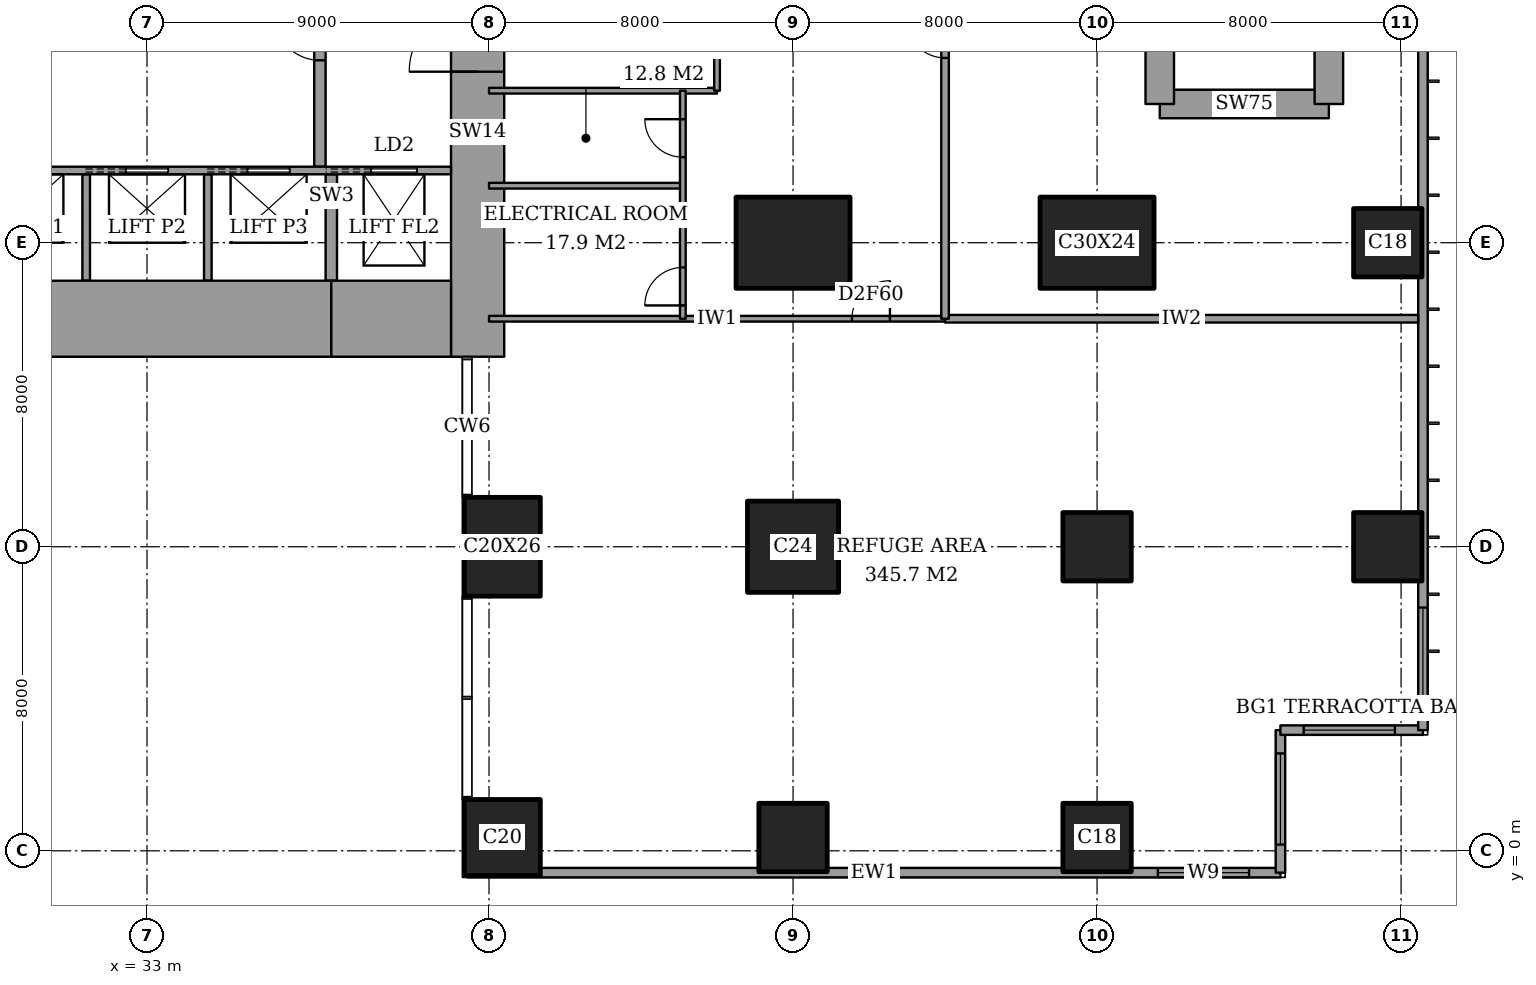
"""IFC4 building model, lengths in metres.
Left out: names, types, materials, properties, quantities, classifications, styles, units other than length and angle.
Written with IfcOpenShell. Run it as: python <this file> out.ifc"""

import sys

from ifc_helpers import new_model, si_unit, direction, frame, frame_2d, origin, origin_2d, place, context, subcontext, project, spatial, rectangle, extrude, element, fill, save


model = new_model("IFC4")
c1 = context("Model", 3, precision=1e-05, world=origin(), true_north=direction((0.0, 1.0)))
c2 = subcontext(c1, "Body", "Model", "MODEL_VIEW")
j1 = project(units=[si_unit("LENGTHUNIT", "METRE"), si_unit("PLANEANGLEUNIT", "RADIAN")], contexts=[c1])
p1 = place(None, origin())
s1 = spatial("IfcSite", under=j1, at=p1, CompositionType="ELEMENT")
p2 = place(p1, origin())
s2 = spatial("IfcBuilding", under=s1, at=p2, CompositionType="ELEMENT")
p3 = place(p2, frame((0.0, 0.0, 171.8)))
s3 = spatial("IfcBuildingStorey", under=s2, at=p3, CompositionType="ELEMENT", Elevation=171.8)
p4 = place(p3, frame((42.35, 0.35, 0.0), z_axis=(0.0, 0.0, 1.0), x_axis=(1.0, 0.0, 0.0)))
e1 = element("IfcColumn", 1, at=p4, inside=s3, PredefinedType="COLUMN", context=c2, shape_type="SweptSolid", body=[
    extrude(rectangle(XDim=2.0, YDim=2.0, at=origin_2d()), origin(), (0.0, 0.0, 1.0), 5.4),
])
p5 = place(p3, frame((42.35, 8.0, 0.0), z_axis=(0.0, 0.0, 1.0), x_axis=(1.0, 0.0, 0.0)))
e2 = element("IfcColumn", 2, at=p5, inside=s3, PredefinedType="COLUMN", context=c2, shape_type="SweptSolid", body=[
    extrude(rectangle(XDim=2.0, YDim=2.6, at=origin_2d()), origin(), (0.0, 0.0, 1.0), 5.4),
])
p6 = place(p3, frame((50.0, 0.35, 0.0), z_axis=(0.0, 0.0, 1.0), x_axis=(1.0, 0.0, 0.0)))
e3 = element("IfcColumn", 3, at=p6, inside=s3, PredefinedType="COLUMN", context=c2, shape_type="SweptSolid", body=[
    extrude(rectangle(XDim=1.8, YDim=1.8, at=origin_2d()), origin(), (0.0, 0.0, 1.0), 5.4),
])
p7 = place(p3, frame((50.0, 8.0, 0.0), z_axis=(0.0, 0.0, 1.0), x_axis=(1.0, 0.0, 0.0)))
e4 = element("IfcColumn", 4, at=p7, inside=s3, PredefinedType="COLUMN", context=c2, shape_type="SweptSolid", body=[
    extrude(rectangle(XDim=2.4, YDim=2.4, at=origin_2d()), origin(), (0.0, 0.0, 1.0), 5.4),
])
p8 = place(p3, frame((50.0, 16.0, 0.0), z_axis=(0.0, 0.0, 1.0), x_axis=(1.0, 0.0, 0.0)))
e5 = element("IfcColumn", 5, at=p8, inside=s3, PredefinedType="COLUMN", context=c2, shape_type="SweptSolid", body=[
    extrude(rectangle(XDim=3.0, YDim=2.4, at=origin_2d()), origin(), (0.0, 0.0, 1.0), 5.4),
])
for number, where, z_axis, x_axis in (
    (6, (58.0, 0.35, 0.0), (0.0, 0.0, 1.0), (1.0, 0.0, 0.0)),
    (7, (58.0, 8.0, 0.0), (0.0, 0.0, 1.0), (1.0, 0.0, 0.0)),
):
    element("IfcColumn", number, at=place(p3, frame(where, z_axis=z_axis, x_axis=x_axis)), inside=s3, PredefinedType="COLUMN", context=c2, shape_type="SweptSolid", body=[
        extrude(rectangle(XDim=1.8, YDim=1.8, at=origin_2d()), origin(), (0.0, 0.0, 1.0), 5.4),
    ])
p9 = place(p3, frame((58.0, 16.0, 0.0), z_axis=(0.0, 0.0, 1.0), x_axis=(1.0, 0.0, 0.0)))
e8 = element("IfcColumn", 8, at=p9, inside=s3, PredefinedType="COLUMN", context=c2, shape_type="SweptSolid", body=[
    extrude(rectangle(XDim=3.0, YDim=2.4, at=origin_2d()), origin(), (0.0, 0.0, 1.0), 5.4),
])
for number, where, z_axis, x_axis in (
    (9, (65.65, 8.0, 0.0), (0.0, 0.0, 1.0), (1.0, 0.0, 0.0)),
    (10, (65.65, 16.0, 0.0), (0.0, 0.0, 1.0), (1.0, 0.0, 0.0)),
):
    element("IfcColumn", number, at=place(p3, frame(where, z_axis=z_axis, x_axis=x_axis)), inside=s3, PredefinedType="COLUMN", context=c2, shape_type="SweptSolid", body=[
        extrude(rectangle(XDim=1.8, YDim=1.8, at=origin_2d()), origin(), (0.0, 0.0, 1.0), 5.4),
    ])
p10 = place(p3, frame((28.15, 14.0, 0.0), z_axis=(0.0, 0.0, 1.0), x_axis=(1.0, 0.0, 0.0)))
e11 = element("IfcWall", 11, at=p10, inside=s3, PredefinedType="SHEAR", context=c2, shape_type="SweptSolid", body=[
    extrude(rectangle(XDim=9.7, YDim=2.0, at=frame_2d((4.85, 0.0))), origin(), (0.0, 0.0, 1.0), 5.4),
])
p11 = place(p3, frame((37.85, 14.0, 0.0), z_axis=(0.0, 0.0, 1.0), x_axis=(1.0, 0.0, 0.0)))
e12 = element("IfcWall", 12, at=p11, inside=s3, PredefinedType="SHEAR", context=c2, shape_type="SweptSolid", body=[
    extrude(rectangle(XDim=3.15, YDim=2.0, at=frame_2d((1.575, 0.0))), origin(), (0.0, 0.0, 1.0), 5.4),
])
p12 = place(p3, frame((41.7, 13.0, 0.0), z_axis=(0.0, 0.0, 1.0), x_axis=(0.0, 1.0, 0.0)))
e13 = element("IfcWall", 13, at=p12, inside=s3, PredefinedType="SHEAR", context=c2, shape_type="SweptSolid", body=[
    extrude(rectangle(XDim=11.85, YDim=1.4, at=frame_2d((5.925, 0.0))), origin(), (0.0, 0.0, 1.0), 5.4),
])
p13 = place(p12, frame((7.5, 0.0, 0.0)))
e14 = element("IfcOpeningElement", 14, at=p13, cuts=e13, PredefinedType="OPENING", context=c2, shape_type="SweptSolid", body=[
    extrude(rectangle(XDim=1.8, YDim=2.4, at=frame_2d((0.9, 1.2))), frame((0.0, 0.71, 0.0), z_axis=(0.0, -1.0, 0.0), x_axis=(1.0, 0.0, 0.0)), (0.0, 0.0, 1.0), 1.42),
])
p14 = place(p3, frame((37.55, 18.0, 0.0), z_axis=(0.0, 0.0, 1.0), x_axis=(0.0, 1.0, 0.0)))
e15 = element("IfcWall", 15, at=p14, inside=s3, PredefinedType="PARTITIONING", context=c2, shape_type="SweptSolid", body=[
    extrude(rectangle(XDim=6.7, YDim=0.3, at=frame_2d((3.35, 0.0))), origin(), (0.0, 0.0, 1.0), 5.4),
])
p15 = place(p14, frame((2.8, 0.0, 0.0)))
e16 = element("IfcOpeningElement", 16, at=p15, cuts=e15, PredefinedType="OPENING", context=c2, shape_type="SweptSolid", body=[
    extrude(rectangle(XDim=1.2, YDim=2.1, at=frame_2d((0.6, 1.05))), frame((0.0, 0.16, 0.0), z_axis=(0.0, -1.0, 0.0), x_axis=(1.0, 0.0, 0.0)), (0.0, 0.0, 1.0), 0.32),
])
p16 = place(p3, frame((59.65, 19.65, 0.0), z_axis=(0.0, 0.0, 1.0), x_axis=(1.0, 0.0, 0.0)))
e17 = element("IfcWall", 17, at=p16, inside=s3, PredefinedType="SHEAR", context=c2, shape_type="SweptSolid", body=[
    extrude(rectangle(XDim=4.45, YDim=0.75, at=frame_2d((2.225, 0.0))), origin(), (0.0, 0.0, 1.0), 5.4),
])
for number, where, z_axis, x_axis in (
    (18, (64.1, 19.65, 0.0), (0.0, 0.0, 1.0), (0.0, 1.0, 0.0)),
    (19, (59.65, 28.35, 0.0), (0.0, 0.0, 1.0), (0.0, -1.0, 0.0)),
):
    element("IfcWall", number, at=place(p3, frame(where, z_axis=z_axis, x_axis=x_axis)), inside=s3, PredefinedType="SHEAR", context=c2, shape_type="SweptSolid", body=[
        extrude(rectangle(XDim=8.7, YDim=0.75, at=frame_2d((4.35, 0.0))), origin(), (0.0, 0.0, 1.0), 5.4),
    ])
p17 = place(p3, frame((41.425, -0.575, 0.0), z_axis=(0.0, 0.0, 1.0), x_axis=(1.0, 0.0, 0.0)))
e20 = element("IfcWall", 20, at=p17, inside=s3, PredefinedType="SOLIDWALL", context=c2, shape_type="SweptSolid", body=[
    extrude(rectangle(XDim=21.4, YDim=0.25, at=frame_2d((10.7, 0.0))), origin(), (0.0, 0.0, 1.0), 5.4),
])
p18 = place(p17, frame((18.175, 0.0, 0.9)))
e21 = element("IfcOpeningElement", 21, at=p18, cuts=e20, PredefinedType="OPENING", context=c2, shape_type="SweptSolid", body=[
    extrude(rectangle(XDim=2.4, YDim=2.4, at=frame_2d((1.2, 1.2))), frame((0.0, 0.135, 0.0), z_axis=(0.0, -1.0, 0.0), x_axis=(1.0, 0.0, 0.0)), (0.0, 0.0, 1.0), 0.27),
])
p19 = place(p3, frame((62.825, -0.575, 0.0), z_axis=(0.0, 0.0, 1.0), x_axis=(0.0, 1.0, 0.0)))
e22 = element("IfcWall", 22, at=p19, inside=s3, PredefinedType="SOLIDWALL", context=c2, shape_type="SweptSolid", body=[
    extrude(rectangle(XDim=3.75, YDim=0.25, at=frame_2d((1.875, 0.0))), origin(), (0.0, 0.0, 1.0), 5.4),
])
p20 = place(p19, frame((0.738, 0.0, 0.9)))
e23 = element("IfcOpeningElement", 23, at=p20, cuts=e22, PredefinedType="OPENING", context=c2, shape_type="SweptSolid", body=[
    extrude(rectangle(XDim=2.4, YDim=2.4, at=frame_2d((1.2, 1.2))), frame((0.0, 0.135, 0.0), z_axis=(0.0, -1.0, 0.0), x_axis=(1.0, 0.0, 0.0)), (0.0, 0.0, 1.0), 0.27),
])
p21 = place(p3, frame((62.825, 3.175, 0.0), z_axis=(0.0, 0.0, 1.0), x_axis=(1.0, 0.0, 0.0)))
e24 = element("IfcWall", 24, at=p21, inside=s3, PredefinedType="SOLIDWALL", context=c2, shape_type="SweptSolid", body=[
    extrude(rectangle(XDim=3.75, YDim=0.25, at=frame_2d((1.875, 0.0))), origin(), (0.0, 0.0, 1.0), 5.4),
])
p22 = place(p21, frame((0.613, 0.0, 0.9)))
e25 = element("IfcOpeningElement", 25, at=p22, cuts=e24, PredefinedType="OPENING", context=c2, shape_type="SweptSolid", body=[
    extrude(rectangle(XDim=2.4, YDim=2.4, at=frame_2d((1.2, 1.2))), frame((0.0, 0.135, 0.0), z_axis=(0.0, -1.0, 0.0), x_axis=(1.0, 0.0, 0.0)), (0.0, 0.0, 1.0), 0.27),
])
p23 = place(p3, frame((66.575, 3.175, 0.0), z_axis=(0.0, 0.0, 1.0), x_axis=(0.0, 1.0, 0.0)))
e26 = element("IfcWall", 26, at=p23, inside=s3, PredefinedType="SOLIDWALL", context=c2, shape_type="SweptSolid", body=[
    extrude(rectangle(XDim=41.65, YDim=0.25, at=frame_2d((20.825, 0.0))), origin(), (0.0, 0.0, 1.0), 5.4),
])
p24 = place(p23, frame((0.825, 0.0, 0.9)))
e27 = element("IfcOpeningElement", 27, at=p24, cuts=e26, PredefinedType="OPENING", context=c2, shape_type="SweptSolid", body=[
    extrude(rectangle(XDim=2.4, YDim=2.4, at=frame_2d((1.2, 1.2))), frame((0.0, 0.135, 0.0), z_axis=(0.0, -1.0, 0.0), x_axis=(1.0, 0.0, 0.0)), (0.0, 0.0, 1.0), 0.27),
])
p25 = place(p23, frame((38.425, 0.0, 0.9)))
e28 = element("IfcOpeningElement", 28, at=p25, cuts=e26, PredefinedType="OPENING", context=c2, shape_type="SweptSolid", body=[
    extrude(rectangle(XDim=2.4, YDim=2.4, at=frame_2d((1.2, 1.2))), frame((0.0, 0.135, 0.0), z_axis=(0.0, -1.0, 0.0), x_axis=(1.0, 0.0, 0.0)), (0.0, 0.0, 1.0), 0.27),
])
p26 = place(p3, frame((54.0, 14.0, 0.0), z_axis=(0.0, 0.0, 1.0), x_axis=(1.0, 0.0, 0.0)))
e29 = element("IfcWall", 29, at=p26, inside=s3, PredefinedType="PARTITIONING", context=c2, shape_type="SweptSolid", body=[
    extrude(rectangle(XDim=12.45, YDim=0.2, at=frame_2d((6.225, 0.0))), origin(), (0.0, 0.0, 1.0), 5.15),
])
p27 = place(p3, frame((42.0, 14.0, 0.0), z_axis=(0.0, 0.0, 1.0), x_axis=(1.0, 0.0, 0.0)))
e30 = element("IfcWall", 30, at=p27, inside=s3, PredefinedType="PARTITIONING", context=c2, shape_type="SweptSolid", body=[
    extrude(rectangle(XDim=12.0, YDim=0.15, at=frame_2d((6.0, 0.0))), origin(), (0.0, 0.0, 1.0), 5.15),
])
p28 = place(p27, frame((9.55, 0.0, 0.0)))
e31 = element("IfcOpeningElement", 31, at=p28, cuts=e30, PredefinedType="OPENING", context=c2, shape_type="SweptSolid", body=[
    extrude(rectangle(XDim=1.0, YDim=2.1, at=frame_2d((0.5, 1.05))), frame((0.0, 0.085, 0.0), z_axis=(0.0, -1.0, 0.0), x_axis=(1.0, 0.0, 0.0)), (0.0, 0.0, 1.0), 0.17),
])
p29 = place(p3, frame((42.0, 17.5, 0.0), z_axis=(0.0, 0.0, 1.0), x_axis=(1.0, 0.0, 0.0)))
e32 = element("IfcWall", 32, at=p29, inside=s3, PredefinedType="PARTITIONING", context=c2, shape_type="SweptSolid", body=[
    extrude(rectangle(XDim=5.1, YDim=0.15, at=frame_2d((2.55, 0.0))), origin(), (0.0, 0.0, 1.0), 5.15),
])
p30 = place(p3, frame((42.0, 20.0, 0.0), z_axis=(0.0, 0.0, 1.0), x_axis=(1.0, 0.0, 0.0)))
e33 = element("IfcWall", 33, at=p30, inside=s3, PredefinedType="PARTITIONING", context=c2, shape_type="SweptSolid", body=[
    extrude(rectangle(XDim=6.0, YDim=0.15, at=frame_2d((3.0, 0.0))), origin(), (0.0, 0.0, 1.0), 5.15),
])
p31 = place(p3, frame((47.1, 14.0, 0.0), z_axis=(0.0, 0.0, 1.0), x_axis=(0.0, 1.0, 0.0)))
e34 = element("IfcWall", 34, at=p31, inside=s3, PredefinedType="PARTITIONING", context=c2, shape_type="SweptSolid", body=[
    extrude(rectangle(XDim=6.0, YDim=0.15, at=frame_2d((3.0, 0.0))), origin(), (0.0, 0.0, 1.0), 5.15),
])
p32 = place(p31, frame((0.35, 0.0, 0.0)))
e35 = element("IfcOpeningElement", 35, at=p32, cuts=e34, PredefinedType="OPENING", context=c2, shape_type="SweptSolid", body=[
    extrude(rectangle(XDim=1.0, YDim=2.1, at=frame_2d((0.5, 1.05))), frame((0.0, 0.085, 0.0), z_axis=(0.0, -1.0, 0.0), x_axis=(1.0, 0.0, 0.0)), (0.0, 0.0, 1.0), 0.17),
])
p33 = place(p31, frame((4.25, 0.0, 0.0)))
e36 = element("IfcOpeningElement", 36, at=p33, cuts=e34, PredefinedType="OPENING", context=c2, shape_type="SweptSolid", body=[
    extrude(rectangle(XDim=1.0, YDim=2.1, at=frame_2d((0.5, 1.05))), frame((0.0, 0.085, 0.0), z_axis=(0.0, -1.0, 0.0), x_axis=(1.0, 0.0, 0.0)), (0.0, 0.0, 1.0), 0.17),
])
p34 = place(p3, frame((48.0, 20.0, 0.0), z_axis=(0.0, 0.0, 1.0), x_axis=(0.0, 1.0, 0.0)))
e37 = element("IfcWall", 37, at=p34, inside=s3, PredefinedType="PARTITIONING", context=c2, shape_type="SweptSolid", body=[
    extrude(rectangle(XDim=8.0, YDim=0.15, at=frame_2d((4.0, 0.0))), origin(), (0.0, 0.0, 1.0), 5.15),
])
p35 = place(p34, frame((4.7, 0.0, 0.0)))
e38 = element("IfcOpeningElement", 38, at=p35, cuts=e37, PredefinedType="OPENING", context=c2, shape_type="SweptSolid", body=[
    extrude(rectangle(XDim=1.0, YDim=2.1, at=frame_2d((0.5, 1.05))), frame((0.0, 0.085, 0.0), z_axis=(0.0, -1.0, 0.0), x_axis=(1.0, 0.0, 0.0)), (0.0, 0.0, 1.0), 0.17),
])
p36 = place(p3, frame((54.0, 14.0, 0.0), z_axis=(0.0, 0.0, 1.0), x_axis=(0.0, 1.0, 0.0)))
e39 = element("IfcWall", 39, at=p36, inside=s3, PredefinedType="PARTITIONING", context=c2, shape_type="SweptSolid", body=[
    extrude(rectangle(XDim=14.725, YDim=0.2, at=frame_2d((7.363, 0.0))), origin(), (0.0, 0.0, 1.0), 5.15),
])
p37 = place(p36, frame((6.863, 0.0, 0.0)))
e40 = element("IfcOpeningElement", 40, at=p37, cuts=e39, PredefinedType="OPENING", context=c2, shape_type="SweptSolid", body=[
    extrude(rectangle(XDim=1.0, YDim=2.1, at=frame_2d((0.5, 1.05))), frame((0.0, 0.11, 0.0), z_axis=(0.0, -1.0, 0.0), x_axis=(1.0, 0.0, 0.0)), (0.0, 0.0, 1.0), 0.22),
])
p38 = place(p3, frame((28.3, 17.9, 0.0), z_axis=(0.0, 0.0, 1.0), x_axis=(1.0, 0.0, 0.0)))
e41 = element("IfcWall", 41, at=p38, inside=s3, PredefinedType="PARTITIONING", context=c2, shape_type="SweptSolid", body=[
    extrude(rectangle(XDim=12.7, YDim=0.2, at=frame_2d((6.35, 0.0))), origin(), (0.0, 0.0, 1.0), 5.4),
])
p39 = place(p38, frame((0.95, 0.0, 0.0)))
e42 = element("IfcOpeningElement", 42, at=p39, cuts=e41, PredefinedType="OPENING", context=c2, shape_type="SweptSolid", body=[
    extrude(rectangle(XDim=1.1, YDim=2.1, at=frame_2d((0.55, 1.05))), frame((0.0, 0.11, 0.0), z_axis=(0.0, -1.0, 0.0), x_axis=(1.0, 0.0, 0.0)), (0.0, 0.0, 1.0), 0.22),
])
p40 = place(p38, frame((4.15, 0.0, 0.0)))
e43 = element("IfcOpeningElement", 43, at=p40, cuts=e41, PredefinedType="OPENING", context=c2, shape_type="SweptSolid", body=[
    extrude(rectangle(XDim=1.1, YDim=2.1, at=frame_2d((0.55, 1.05))), frame((0.0, 0.11, 0.0), z_axis=(0.0, -1.0, 0.0), x_axis=(1.0, 0.0, 0.0)), (0.0, 0.0, 1.0), 0.22),
])
p41 = place(p38, frame((7.35, 0.0, 0.0)))
e44 = element("IfcOpeningElement", 44, at=p41, cuts=e41, PredefinedType="OPENING", context=c2, shape_type="SweptSolid", body=[
    extrude(rectangle(XDim=1.1, YDim=2.1, at=frame_2d((0.55, 1.05))), frame((0.0, 0.11, 0.0), z_axis=(0.0, -1.0, 0.0), x_axis=(1.0, 0.0, 0.0)), (0.0, 0.0, 1.0), 0.22),
])
p42 = place(p38, frame((10.6, 0.0, 0.0)))
e45 = element("IfcOpeningElement", 45, at=p42, cuts=e41, PredefinedType="OPENING", context=c2, shape_type="SweptSolid", body=[
    extrude(rectangle(XDim=1.2, YDim=2.1, at=frame_2d((0.6, 1.05))), frame((0.0, 0.11, 0.0), z_axis=(0.0, -1.0, 0.0), x_axis=(1.0, 0.0, 0.0)), (0.0, 0.0, 1.0), 0.22),
])
for number, where, z_axis, x_axis in (
    (46, (31.4, 15.0, 0.0), (0.0, 0.0, 1.0), (0.0, 1.0, 0.0)),
    (47, (34.6, 15.0, 0.0), (0.0, 0.0, 1.0), (0.0, 1.0, 0.0)),
):
    element("IfcWall", number, at=place(p3, frame(where, z_axis=z_axis, x_axis=x_axis)), inside=s3, PredefinedType="PARTITIONING", context=c2, shape_type="SweptSolid", body=[
        extrude(rectangle(XDim=2.8, YDim=0.2, at=frame_2d((1.4, 0.0))), origin(), (0.0, 0.0, 1.0), 5.4),
    ])
p43 = place(p3, frame((37.85, 15.0, 0.0), z_axis=(0.0, 0.0, 1.0), x_axis=(0.0, 1.0, 0.0)))
e48 = element("IfcWall", 48, at=p43, inside=s3, PredefinedType="SHEAR", context=c2, shape_type="SweptSolid", body=[
    extrude(rectangle(XDim=2.8, YDim=0.3, at=frame_2d((1.4, 0.0))), origin(), (0.0, 0.0, 1.0), 5.4),
])
p44 = place(p18, origin())
e49 = element("IfcWindow", 49, at=p44, inside=s3, PartitioningType="SINGLE_PANEL", PredefinedType="WINDOW", context=c2, shape_type="SweptSolid", body=[
    extrude(rectangle(XDim=2.4, YDim=2.4, at=frame_2d((1.2, 1.2))), frame((0.0, 0.03, 0.0), z_axis=(0.0, -1.0, 0.0), x_axis=(1.0, 0.0, 0.0)), (0.0, 0.0, 1.0), 0.06),
])
fill(e21, e49)
p45 = place(p20, origin())
e50 = element("IfcWindow", 50, at=p45, inside=s3, PartitioningType="SINGLE_PANEL", PredefinedType="WINDOW", context=c2, shape_type="SweptSolid", body=[
    extrude(rectangle(XDim=2.4, YDim=2.4, at=frame_2d((1.2, 1.2))), frame((0.0, 0.03, 0.0), z_axis=(0.0, -1.0, 0.0), x_axis=(1.0, 0.0, 0.0)), (0.0, 0.0, 1.0), 0.06),
])
fill(e23, e50)
p46 = place(p22, origin())
e51 = element("IfcWindow", 51, at=p46, inside=s3, PartitioningType="SINGLE_PANEL", PredefinedType="WINDOW", context=c2, shape_type="SweptSolid", body=[
    extrude(rectangle(XDim=2.4, YDim=2.4, at=frame_2d((1.2, 1.2))), frame((0.0, 0.03, 0.0), z_axis=(0.0, -1.0, 0.0), x_axis=(1.0, 0.0, 0.0)), (0.0, 0.0, 1.0), 0.06),
])
fill(e25, e51)
p47 = place(p24, origin())
e52 = element("IfcWindow", 52, at=p47, inside=s3, PartitioningType="SINGLE_PANEL", PredefinedType="WINDOW", context=c2, shape_type="SweptSolid", body=[
    extrude(rectangle(XDim=2.4, YDim=2.4, at=frame_2d((1.2, 1.2))), frame((0.0, 0.03, 0.0), z_axis=(0.0, -1.0, 0.0), x_axis=(1.0, 0.0, 0.0)), (0.0, 0.0, 1.0), 0.06),
])
fill(e27, e52)
p48 = place(p28, origin())
e53 = element("IfcDoor", 53, at=p48, inside=s3, OperationType="SINGLE_SWING_LEFT", PredefinedType="DOOR", context=c2, shape_type="SweptSolid", body=[
    extrude(rectangle(XDim=1.0, YDim=2.1, at=frame_2d((0.5, 1.05))), frame((0.0, 0.025, 0.0), z_axis=(0.0, -1.0, 0.0), x_axis=(1.0, 0.0, 0.0)), (0.0, 0.0, 1.0), 0.05),
])
fill(e31, e53)
p49 = place(p37, origin())
e54 = element("IfcDoor", 54, at=p49, inside=s3, OperationType="SINGLE_SWING_LEFT", PredefinedType="DOOR", context=c2, shape_type="SweptSolid", body=[
    extrude(rectangle(XDim=1.0, YDim=2.1, at=frame_2d((0.5, 1.05))), frame((0.0, 0.025, 0.0), z_axis=(0.0, -1.0, 0.0), x_axis=(1.0, 0.0, 0.0)), (0.0, 0.0, 1.0), 0.05),
])
fill(e40, e54)
p50 = place(p32, origin())
e55 = element("IfcDoor", 55, at=p50, inside=s3, OperationType="SINGLE_SWING_RIGHT", PredefinedType="DOOR", context=c2, shape_type="SweptSolid", body=[
    extrude(rectangle(XDim=1.0, YDim=2.1, at=frame_2d((0.5, 1.05))), frame((0.0, 0.025, 0.0), z_axis=(0.0, -1.0, 0.0), x_axis=(1.0, 0.0, 0.0)), (0.0, 0.0, 1.0), 0.05),
])
fill(e35, e55)
p51 = place(p33, origin())
e56 = element("IfcDoor", 56, at=p51, inside=s3, OperationType="SINGLE_SWING_LEFT", PredefinedType="DOOR", context=c2, shape_type="SweptSolid", body=[
    extrude(rectangle(XDim=1.0, YDim=2.1, at=frame_2d((0.5, 1.05))), frame((0.0, 0.025, 0.0), z_axis=(0.0, -1.0, 0.0), x_axis=(1.0, 0.0, 0.0)), (0.0, 0.0, 1.0), 0.05),
])
fill(e36, e56)
p52 = place(p15, origin())
e57 = element("IfcDoor", 57, at=p52, inside=s3, OperationType="SINGLE_SWING_LEFT", PredefinedType="DOOR", context=c2, shape_type="SweptSolid", body=[
    extrude(rectangle(XDim=1.2, YDim=2.1, at=frame_2d((0.6, 1.05))), frame((0.0, 0.025, 0.0), z_axis=(0.0, -1.0, 0.0), x_axis=(1.0, 0.0, 0.0)), (0.0, 0.0, 1.0), 0.05),
])
fill(e16, e57)
p53 = place(p13, origin())
e58 = element("IfcDoor", 58, at=p53, inside=s3, OperationType="DOUBLE_DOOR_DOUBLE_SWING", PredefinedType="DOOR", context=c2, shape_type="SweptSolid", body=[
    extrude(rectangle(XDim=1.8, YDim=2.4, at=frame_2d((0.9, 1.2))), frame((0.0, 0.025, 0.0), z_axis=(0.0, -1.0, 0.0), x_axis=(1.0, 0.0, 0.0)), (0.0, 0.0, 1.0), 0.05),
])
fill(e14, e58)
p54 = place(p40, origin())
e59 = element("IfcDoor", 59, at=p54, inside=s3, OperationType="SLIDING_TO_LEFT", PredefinedType="DOOR", context=c2, shape_type="SweptSolid", body=[
    extrude(rectangle(XDim=1.1, YDim=2.1, at=frame_2d((0.55, 1.05))), frame((0.0, 0.025, 0.0), z_axis=(0.0, -1.0, 0.0), x_axis=(1.0, 0.0, 0.0)), (0.0, 0.0, 1.0), 0.05),
])
fill(e43, e59)
p55 = place(p41, origin())
e60 = element("IfcDoor", 60, at=p55, inside=s3, OperationType="SLIDING_TO_LEFT", PredefinedType="DOOR", context=c2, shape_type="SweptSolid", body=[
    extrude(rectangle(XDim=1.1, YDim=2.1, at=frame_2d((0.55, 1.05))), frame((0.0, 0.025, 0.0), z_axis=(0.0, -1.0, 0.0), x_axis=(1.0, 0.0, 0.0)), (0.0, 0.0, 1.0), 0.05),
])
fill(e44, e60)
p56 = place(p42, origin())
e61 = element("IfcDoor", 61, at=p56, inside=s3, OperationType="SLIDING_TO_LEFT", PredefinedType="DOOR", context=c2, shape_type="SweptSolid", body=[
    extrude(rectangle(XDim=1.2, YDim=2.1, at=frame_2d((0.6, 1.05))), frame((0.0, 0.025, 0.0), z_axis=(0.0, -1.0, 0.0), x_axis=(1.0, 0.0, 0.0)), (0.0, 0.0, 1.0), 0.05),
])
fill(e45, e61)
save(model, sys.argv[1])
